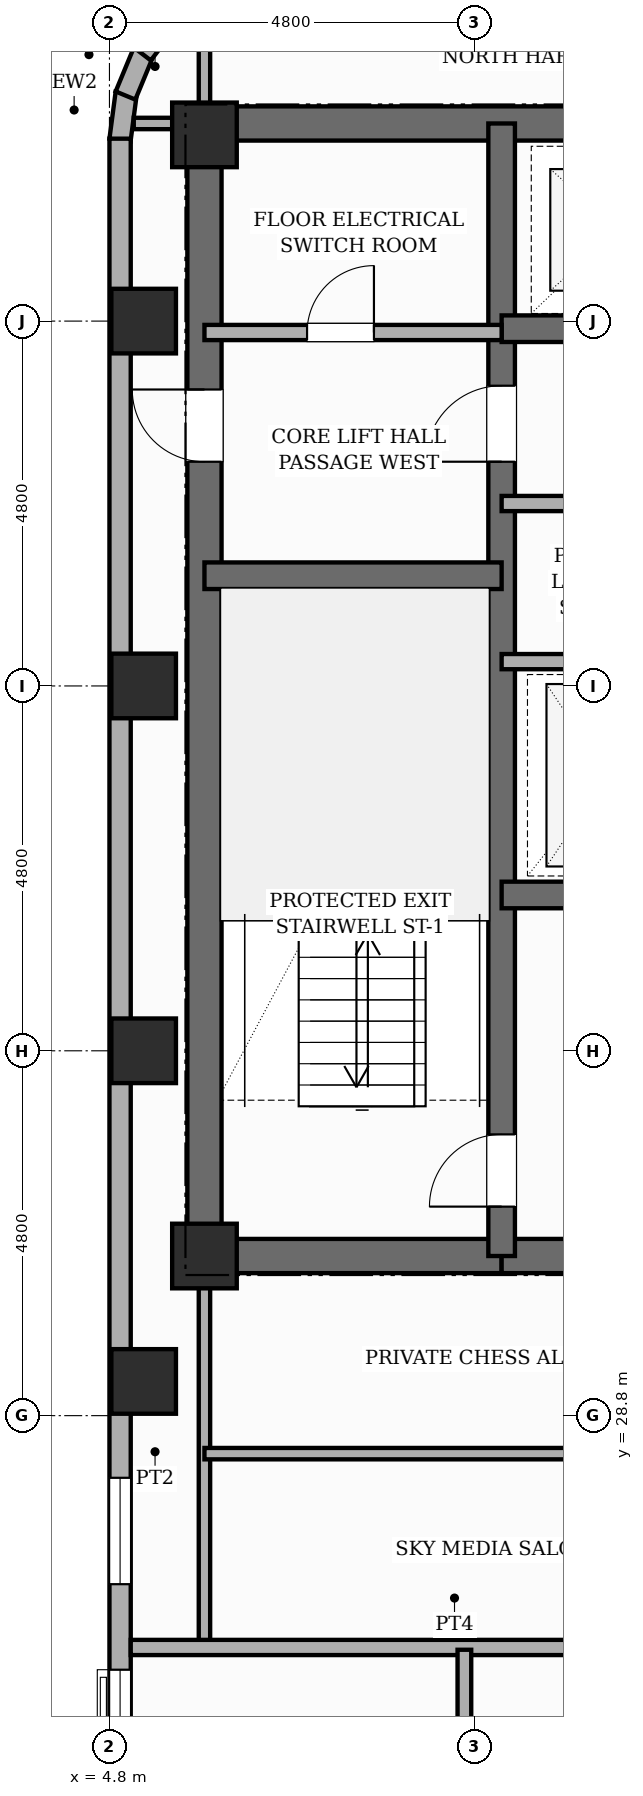
"""IFC4 building model, lengths in metres.
Left out: names, types, materials, properties, quantities, classifications, styles, units other than length and angle.
Written with IfcOpenShell. Run it as: python <this file> out.ifc"""

import sys

from ifc_helpers import new_model, si_unit, direction, frame, frame_2d, origin, origin_2d, place, context, subcontext, project, spatial, rectangle, extrude, element, fill, save


model = new_model("IFC4")
c1 = context("Model", 3, precision=1e-05, world=origin(), true_north=direction((0.0, 1.0)))
c2 = subcontext(c1, "Body", "Model", "MODEL_VIEW")
j1 = project(units=[si_unit("LENGTHUNIT", "METRE"), si_unit("PLANEANGLEUNIT", "RADIAN")], contexts=[c1])
p1 = place(None, origin())
s1 = spatial("IfcSite", under=j1, at=p1, CompositionType="ELEMENT")
p2 = place(p1, origin())
s2 = spatial("IfcBuilding", under=s1, at=p2, CompositionType="ELEMENT")
p3 = place(p2, frame((0.0, 0.0, 211.0)))
s3 = spatial("IfcBuildingStorey", under=s2, at=p3, CompositionType="ELEMENT", Elevation=211.0)
p4 = place(p3, frame((6.05, 30.675, 0.0), z_axis=(0.0, 0.0, 1.0), x_axis=(0.0, 1.0, 0.0)))
e1 = element("IfcWall", 1, at=p4, inside=s3, PredefinedType="SHEAR", context=c2, shape_type="SweptSolid", body=[
    extrude(rectangle(XDim=15.35, YDim=0.45, at=frame_2d((7.675, 0.0))), origin(), (0.0, 0.0, 1.0), 3.6),
])
p5 = place(p4, frame((10.675, 0.0, 0.0)))
e2 = element("IfcOpeningElement", 2, at=p5, cuts=e1, PredefinedType="OPENING", context=c2, shape_type="SweptSolid", body=[
    extrude(rectangle(XDim=0.95, YDim=2.15, at=frame_2d((0.475, 1.075))), frame((0.0, 0.235, 0.0), z_axis=(0.0, -1.0, 0.0), x_axis=(1.0, 0.0, 0.0)), (0.0, 0.0, 1.0), 0.47),
])
p6 = place(p3, frame((6.05, 45.8, 0.0), z_axis=(0.0, 0.0, 1.0), x_axis=(1.0, 0.0, 0.0)))
e3 = element("IfcWall", 3, at=p6, inside=s3, PredefinedType="SHEAR", context=c2, shape_type="SweptSolid", body=[
    extrude(rectangle(XDim=16.7, YDim=0.45, at=frame_2d((8.35, 0.0))), origin(), (0.0, 0.0, 1.0), 3.6),
])
p7 = place(p3, frame((6.05, 30.9, 0.0), z_axis=(0.0, 0.0, 1.0), x_axis=(1.0, 0.0, 0.0)))
e4 = element("IfcWall", 4, at=p7, inside=s3, PredefinedType="SHEAR", context=c2, shape_type="SweptSolid", body=[
    extrude(rectangle(XDim=3.91, YDim=0.45, at=frame_2d((1.955, 0.0))), origin(), (0.0, 0.0, 1.0), 3.6),
])
p8 = place(p3, frame((9.96, 30.9, 0.0), z_axis=(0.0, 0.0, 1.0), x_axis=(1.0, 0.0, 0.0)))
e5 = element("IfcWall", 5, at=p8, inside=s3, PredefinedType="SHEAR", context=c2, shape_type="SweptSolid", body=[
    extrude(rectangle(XDim=8.88, YDim=0.45, at=frame_2d((4.44, 0.0))), origin(), (0.0, 0.0, 1.0), 3.6),
])
p9 = place(p8, frame((4.09, 0.0, 0.0)))
e6 = element("IfcOpeningElement", 6, at=p9, cuts=e5, PredefinedType="OPENING", context=c2, shape_type="SweptSolid", body=[
    extrude(rectangle(XDim=1.0, YDim=2.15, at=frame_2d((0.5, 1.075))), frame((0.0, 0.235, 0.0), z_axis=(0.0, -1.0, 0.0), x_axis=(1.0, 0.0, 0.0)), (0.0, 0.0, 1.0), 0.47),
])
p10 = place(p3, frame((9.96, 30.9, 0.0), z_axis=(0.0, 0.0, 1.0), x_axis=(0.0, 1.0, 0.0)))
e7 = element("IfcWall", 7, at=p10, inside=s3, PredefinedType="SHEAR", context=c2, shape_type="SweptSolid", body=[
    extrude(rectangle(XDim=14.9, YDim=0.35, at=frame_2d((7.45, 0.0))), origin(), (0.0, 0.0, 1.0), 3.6),
])
p11 = place(p10, frame((0.65, 0.0, 0.0)))
e8 = element("IfcOpeningElement", 8, at=p11, cuts=e7, PredefinedType="OPENING", context=c2, shape_type="SweptSolid", body=[
    extrude(rectangle(XDim=0.95, YDim=2.1, at=frame_2d((0.475, 1.05))), frame((0.0, 0.185, 0.0), z_axis=(0.0, -1.0, 0.0), x_axis=(1.0, 0.0, 0.0)), (0.0, 0.0, 1.0), 0.37),
])
p12 = place(p10, frame((10.45, 0.0, 0.0)))
e9 = element("IfcOpeningElement", 9, at=p12, cuts=e7, PredefinedType="OPENING", context=c2, shape_type="SweptSolid", body=[
    extrude(rectangle(XDim=1.0, YDim=2.15, at=frame_2d((0.5, 1.075))), frame((0.0, 0.185, 0.0), z_axis=(0.0, -1.0, 0.0), x_axis=(1.0, 0.0, 0.0)), (0.0, 0.0, 1.0), 0.37),
])
p13 = place(p3, frame((6.05, 39.85, 0.0), z_axis=(0.0, 0.0, 1.0), x_axis=(1.0, 0.0, 0.0)))
e10 = element("IfcWall", 10, at=p13, inside=s3, PredefinedType="SHEAR", context=c2, shape_type="SweptSolid", body=[
    extrude(rectangle(XDim=3.91, YDim=0.35, at=frame_2d((1.955, 0.0))), origin(), (0.0, 0.0, 1.0), 3.6),
])
p14 = place(p3, frame((9.96, 35.65, 0.0), z_axis=(0.0, 0.0, 1.0), x_axis=(1.0, 0.0, 0.0)))
e11 = element("IfcWall", 11, at=p14, inside=s3, PredefinedType="SHEAR", context=c2, shape_type="SweptSolid", body=[
    extrude(rectangle(XDim=8.88, YDim=0.35, at=frame_2d((4.44, 0.0))), origin(), (0.0, 0.0, 1.0), 3.6),
])
p15 = place(p14, frame((0.84, 0.0, 0.0)))
e12 = element("IfcOpeningElement", 12, at=p15, cuts=e11, PredefinedType="OPENING", context=c2, shape_type="SweptSolid", body=[
    extrude(rectangle(XDim=1.1, YDim=2.15, at=frame_2d((0.55, 1.075))), frame((0.0, 0.185, 0.0), z_axis=(0.0, -1.0, 0.0), x_axis=(1.0, 0.0, 0.0)), (0.0, 0.0, 1.0), 0.37),
])
p16 = place(p14, frame((5.24, 0.0, 0.0)))
e13 = element("IfcOpeningElement", 13, at=p16, cuts=e11, PredefinedType="OPENING", context=c2, shape_type="SweptSolid", body=[
    extrude(rectangle(XDim=1.1, YDim=2.15, at=frame_2d((0.55, 1.075))), frame((0.0, 0.185, 0.0), z_axis=(0.0, -1.0, 0.0), x_axis=(1.0, 0.0, 0.0)), (0.0, 0.0, 1.0), 0.37),
])
p17 = place(p14, frame((7.5, 0.0, 0.0)))
e14 = element("IfcOpeningElement", 14, at=p17, cuts=e11, PredefinedType="OPENING", context=c2, shape_type="SweptSolid", body=[
    extrude(rectangle(XDim=0.88, YDim=2.1, at=frame_2d((0.44, 1.05))), frame((0.0, 0.185, 0.0), z_axis=(0.0, -1.0, 0.0), x_axis=(1.0, 0.0, 0.0)), (0.0, 0.0, 1.0), 0.37),
])
p18 = place(p3, frame((9.96, 43.1, 0.0), z_axis=(0.0, 0.0, 1.0), x_axis=(1.0, 0.0, 0.0)))
e15 = element("IfcWall", 15, at=p18, inside=s3, PredefinedType="SHEAR", context=c2, shape_type="SweptSolid", body=[
    extrude(rectangle(XDim=8.88, YDim=0.35, at=frame_2d((4.44, 0.0))), origin(), (0.0, 0.0, 1.0), 3.6),
])
p19 = place(p18, frame((0.99, 0.0, 0.0)))
e16 = element("IfcOpeningElement", 16, at=p19, cuts=e15, PredefinedType="OPENING", context=c2, shape_type="SweptSolid", body=[
    extrude(rectangle(XDim=1.1, YDim=2.15, at=frame_2d((0.55, 1.075))), frame((0.0, 0.185, 0.0), z_axis=(0.0, -1.0, 0.0), x_axis=(1.0, 0.0, 0.0)), (0.0, 0.0, 1.0), 0.37),
])
p20 = place(p18, frame((3.89, 0.0, 0.0)))
e17 = element("IfcOpeningElement", 17, at=p20, cuts=e15, PredefinedType="OPENING", context=c2, shape_type="SweptSolid", body=[
    extrude(rectangle(XDim=1.1, YDim=2.15, at=frame_2d((0.55, 1.075))), frame((0.0, 0.185, 0.0), z_axis=(0.0, -1.0, 0.0), x_axis=(1.0, 0.0, 0.0)), (0.0, 0.0, 1.0), 0.37),
])
p21 = place(p18, frame((6.79, 0.0, 0.0)))
e18 = element("IfcOpeningElement", 18, at=p21, cuts=e15, PredefinedType="OPENING", context=c2, shape_type="SweptSolid", body=[
    extrude(rectangle(XDim=1.1, YDim=2.15, at=frame_2d((0.55, 1.075))), frame((0.0, 0.185, 0.0), z_axis=(0.0, -1.0, 0.0), x_axis=(1.0, 0.0, 0.0)), (0.0, 0.0, 1.0), 0.37),
])
for number, where, z_axis, x_axis in (
    (19, (5.25, 29.25, 0.0), (0.0, 0.0, 1.0), (1.0, 0.0, 0.0)),
    (20, (5.25, 33.6, 0.0), (0.0, 0.0, 1.0), (1.0, 0.0, 0.0)),
    (21, (5.25, 38.4, 0.0), (0.0, 0.0, 1.0), (1.0, 0.0, 0.0)),
    (22, (5.25, 43.2, 0.0), (0.0, 0.0, 1.0), (1.0, 0.0, 0.0)),
    (23, (6.05, 30.9, 0.0), (0.0, 0.0, 1.0), (1.0, 0.0, 0.0)),
    (24, (6.05, 45.65, 0.0), (0.0, 0.0, 1.0), (1.0, 0.0, 0.0)),
):
    element("IfcColumn", number, at=place(p3, frame(where, z_axis=z_axis, x_axis=x_axis)), inside=s3, PredefinedType="COLUMN", context=c2, shape_type="SweptSolid", body=[
        extrude(rectangle(XDim=0.85, YDim=0.85, at=origin_2d()), origin(), (0.0, 0.0, 1.0), 3.6),
    ])
for number, where, z_axis, x_axis in (
    (25, (4.939, 45.582, 0.0), (0.0, 0.0, 1.0), (0.131, 0.991, 0.0)),
    (26, (5.011, 46.167, 0.0), (0.0, 0.0, 1.0), (0.383, 0.924, 0.0)),
    (27, (5.233, 46.715, 0.0), (0.0, 0.0, 1.0), (0.609, 0.793, 0.0)),
):
    element("IfcWall", number, at=place(p3, frame(where, z_axis=z_axis, x_axis=x_axis)), inside=s3, PredefinedType="STANDARD", context=c2, shape_type="SweptSolid", body=[
        extrude(rectangle(XDim=0.626, YDim=0.28, at=frame_2d((0.313, 0.0))), origin(), (0.0, 0.0, 1.0), 3.38),
    ])
p22 = place(p3, frame((4.94, 12.0, 0.0), z_axis=(0.0, 0.0, 1.0), x_axis=(0.0, 1.0, 0.0)))
e28 = element("IfcWall", 28, at=p22, inside=s3, PredefinedType="STANDARD", context=c2, shape_type="SweptSolid", body=[
    extrude(rectangle(XDim=33.6, YDim=0.28, at=frame_2d((16.8, 0.0))), origin(), (0.0, 0.0, 1.0), 2.66),
])
p23 = place(p22, frame((9.05, 0.0, 0.0)))
e29 = element("IfcOpeningElement", 29, at=p23, cuts=e28, PredefinedType="OPENING", context=c2, shape_type="SweptSolid", body=[
    extrude(rectangle(XDim=1.1, YDim=2.15, at=frame_2d((0.55, 1.075))), frame((0.0, 0.15, 0.0), z_axis=(0.0, -1.0, 0.0), x_axis=(1.0, 0.0, 0.0)), (0.0, 0.0, 1.0), 0.3),
])
p24 = place(p22, frame((3.77, 0.0, 0.65)))
e30 = element("IfcOpeningElement", 30, at=p24, cuts=e28, PredefinedType="OPENING", context=c2, shape_type="SweptSolid", body=[
    extrude(rectangle(XDim=1.4, YDim=1.1, at=frame_2d((0.7, 0.55))), frame((0.0, 0.15, 0.0), z_axis=(0.0, -1.0, 0.0), x_axis=(1.0, 0.0, 0.0)), (0.0, 0.0, 1.0), 0.3),
])
p25 = place(p22, frame((0.731, 0.0, 0.45)))
e31 = element("IfcOpeningElement", 31, at=p25, cuts=e28, PredefinedType="OPENING", context=c2, shape_type="SweptSolid", body=[
    extrude(rectangle(XDim=0.95, YDim=1.8, at=frame_2d((0.475, 0.9))), frame((0.0, 0.15, 0.0), z_axis=(0.0, -1.0, 0.0), x_axis=(1.0, 0.0, 0.0)), (0.0, 0.0, 1.0), 0.3),
])
p26 = place(p22, frame((5.772, 0.0, 0.45)))
e32 = element("IfcOpeningElement", 32, at=p26, cuts=e28, PredefinedType="OPENING", context=c2, shape_type="SweptSolid", body=[
    extrude(rectangle(XDim=0.75, YDim=1.8, at=frame_2d((0.375, 0.9))), frame((0.0, 0.15, 0.0), z_axis=(0.0, -1.0, 0.0), x_axis=(1.0, 0.0, 0.0)), (0.0, 0.0, 1.0), 0.3),
])
p27 = place(p22, frame((12.708, 0.0, 0.45)))
e33 = element("IfcOpeningElement", 33, at=p27, cuts=e28, PredefinedType="OPENING", context=c2, shape_type="SweptSolid", body=[
    extrude(rectangle(XDim=0.75, YDim=1.8, at=frame_2d((0.375, 0.9))), frame((0.0, 0.15, 0.0), z_axis=(0.0, -1.0, 0.0), x_axis=(1.0, 0.0, 0.0)), (0.0, 0.0, 1.0), 0.3),
])
p28 = place(p22, frame((14.583, 0.0, 0.65)))
e34 = element("IfcOpeningElement", 34, at=p28, cuts=e28, PredefinedType="OPENING", context=c2, shape_type="SweptSolid", body=[
    extrude(rectangle(XDim=1.4, YDim=1.1, at=frame_2d((0.7, 0.55))), frame((0.0, 0.15, 0.0), z_axis=(0.0, -1.0, 0.0), x_axis=(1.0, 0.0, 0.0)), (0.0, 0.0, 1.0), 0.3),
])
p29 = place(p3, frame((9.96, 38.72, 0.0), z_axis=(0.0, 0.0, 1.0), x_axis=(1.0, 0.0, 0.0)))
e35 = element("IfcWall", 35, at=p29, inside=s3, PredefinedType="POLYGONAL", context=c2, shape_type="SweptSolid", body=[
    extrude(rectangle(XDim=7.06, YDim=0.2, at=frame_2d((3.53, 0.0))), origin(), (0.0, 0.0, 1.0), 3.38),
])
p30 = place(p3, frame((9.96, 40.8, 0.0), z_axis=(0.0, 0.0, 1.0), x_axis=(1.0, 0.0, 0.0)))
e36 = element("IfcWall", 36, at=p30, inside=s3, PredefinedType="POLYGONAL", context=c2, shape_type="SweptSolid", body=[
    extrude(rectangle(XDim=8.88, YDim=0.2, at=frame_2d((4.44, 0.0))), origin(), (0.0, 0.0, 1.0), 3.38),
])
p31 = place(p30, frame((7.5, 0.0, 0.0)))
e37 = element("IfcOpeningElement", 37, at=p31, cuts=e36, PredefinedType="OPENING", context=c2, shape_type="SweptSolid", body=[
    extrude(rectangle(XDim=0.88, YDim=2.1, at=frame_2d((0.44, 1.05))), frame((0.0, 0.11, 0.0), z_axis=(0.0, -1.0, 0.0), x_axis=(1.0, 0.0, 0.0)), (0.0, 0.0, 1.0), 0.22),
])
p32 = place(p30, frame((1.0, 0.0, 0.0)))
e38 = element("IfcOpeningElement", 38, at=p32, cuts=e36, PredefinedType="OPENING", context=c2, shape_type="SweptSolid", body=[
    extrude(rectangle(XDim=0.88, YDim=2.1, at=frame_2d((0.44, 1.05))), frame((0.0, 0.11, 0.0), z_axis=(0.0, -1.0, 0.0), x_axis=(1.0, 0.0, 0.0)), (0.0, 0.0, 1.0), 0.22),
])
p33 = place(p30, frame((3.4, 0.0, 0.0)))
e39 = element("IfcOpeningElement", 39, at=p33, cuts=e36, PredefinedType="OPENING", context=c2, shape_type="SweptSolid", body=[
    extrude(rectangle(XDim=0.88, YDim=2.1, at=frame_2d((0.44, 1.05))), frame((0.0, 0.11, 0.0), z_axis=(0.0, -1.0, 0.0), x_axis=(1.0, 0.0, 0.0)), (0.0, 0.0, 1.0), 0.22),
])
p34 = place(p30, frame((5.55, 0.0, 0.0)))
e40 = element("IfcOpeningElement", 40, at=p34, cuts=e36, PredefinedType="OPENING", context=c2, shape_type="SweptSolid", body=[
    extrude(rectangle(XDim=0.88, YDim=2.1, at=frame_2d((0.44, 1.05))), frame((0.0, 0.11, 0.0), z_axis=(0.0, -1.0, 0.0), x_axis=(1.0, 0.0, 0.0)), (0.0, 0.0, 1.0), 0.22),
])
p35 = place(p3, frame((6.05, 43.05, 0.0), z_axis=(0.0, 0.0, 1.0), x_axis=(1.0, 0.0, 0.0)))
e41 = element("IfcWall", 41, at=p35, inside=s3, PredefinedType="POLYGONAL", context=c2, shape_type="SweptSolid", body=[
    extrude(rectangle(XDim=3.91, YDim=0.2, at=frame_2d((1.955, 0.0))), origin(), (0.0, 0.0, 1.0), 2.66),
])
p36 = place(p35, frame((1.35, 0.0, 0.0)))
e42 = element("IfcOpeningElement", 42, at=p36, cuts=e41, PredefinedType="OPENING", context=c2, shape_type="SweptSolid", body=[
    extrude(rectangle(XDim=0.88, YDim=2.1, at=frame_2d((0.44, 1.05))), frame((0.0, 0.11, 0.0), z_axis=(0.0, -1.0, 0.0), x_axis=(1.0, 0.0, 0.0)), (0.0, 0.0, 1.0), 0.22),
])
p37 = place(p3, frame((6.05, 25.75, 0.0), z_axis=(0.0, 0.0, 1.0), x_axis=(0.0, 1.0, 0.0)))
e43 = element("IfcWall", 43, at=p37, inside=s3, PredefinedType="PARTITIONING", context=c2, shape_type="SweptSolid", body=[
    extrude(rectangle(XDim=5.15, YDim=0.15, at=frame_2d((2.575, 0.0))), origin(), (0.0, 0.0, 1.0), 3.38),
])
p38 = place(p3, frame((6.05, 28.3, 0.0), z_axis=(0.0, 0.0, 1.0), x_axis=(1.0, 0.0, 0.0)))
e44 = element("IfcWall", 44, at=p38, inside=s3, PredefinedType="PARTITIONING", context=c2, shape_type="SweptSolid", body=[
    extrude(rectangle(XDim=7.55, YDim=0.15, at=frame_2d((3.775, 0.0))), origin(), (0.0, 0.0, 1.0), 3.38),
])
p39 = place(p3, frame((5.08, 25.75, 0.0), z_axis=(0.0, 0.0, 1.0), x_axis=(1.0, 0.0, 0.0)))
e45 = element("IfcWall", 45, at=p39, inside=s3, PredefinedType="PARTITIONING", context=c2, shape_type="SweptSolid", body=[
    extrude(rectangle(XDim=8.52, YDim=0.2, at=frame_2d((4.26, 0.0))), origin(), (0.0, 0.0, 1.0), 3.38),
])
p40 = place(p3, frame((9.47, 22.94, 0.0), z_axis=(0.0, 0.0, 1.0), x_axis=(0.0, 1.0, 0.0)))
e46 = element("IfcWall", 46, at=p40, inside=s3, PredefinedType="PLUMBINGWALL", context=c2, shape_type="SweptSolid", body=[
    extrude(rectangle(XDim=2.78, YDim=0.18, at=frame_2d((1.39, 0.0))), origin(), (0.0, 0.0, 1.0), 3.38),
])
p41 = place(p3, frame((5.12, 45.8, 0.0), z_axis=(0.0, 0.0, 1.0), x_axis=(1.0, 0.0, 0.0)))
e47 = element("IfcWall", 47, at=p41, inside=s3, PredefinedType="PARTITIONING", context=c2, shape_type="SweptSolid", body=[
    extrude(rectangle(XDim=0.93, YDim=0.15, at=frame_2d((0.465, 0.0))), origin(), (0.0, 0.0, 1.0), 3.38),
])
p42 = place(p3, frame((6.05, 45.8, 0.0), z_axis=(0.0, 0.0, 1.0), x_axis=(0.0, 1.0, 0.0)))
e48 = element("IfcWall", 48, at=p42, inside=s3, PredefinedType="PARTITIONING", context=c2, shape_type="SweptSolid", body=[
    extrude(rectangle(XDim=1.5, YDim=0.15, at=frame_2d((0.75, 0.0))), origin(), (0.0, 0.0, 1.0), 3.38),
])
p43 = place(p27, origin())
e49 = element("IfcWindow", 49, at=p43, inside=s3, PartitioningType="SINGLE_PANEL", PredefinedType="WINDOW", context=c2, shape_type="SweptSolid", body=[
    extrude(rectangle(XDim=0.75, YDim=1.8, at=frame_2d((0.375, 0.9))), frame((0.0, 0.03, 0.0), z_axis=(0.0, -1.0, 0.0), x_axis=(1.0, 0.0, 0.0)), (0.0, 0.0, 1.0), 0.06),
])
fill(e33, e49)
p44 = place(p28, origin())
e50 = element("IfcWindow", 50, at=p44, inside=s3, PartitioningType="SINGLE_PANEL", PredefinedType="WINDOW", context=c2, shape_type="SweptSolid", body=[
    extrude(rectangle(XDim=1.4, YDim=1.1, at=frame_2d((0.7, 0.55))), frame((0.0, 0.03, 0.0), z_axis=(0.0, -1.0, 0.0), x_axis=(1.0, 0.0, 0.0)), (0.0, 0.0, 1.0), 0.06),
])
fill(e34, e50)
p45 = place(p11, origin())
e51 = element("IfcDoor", 51, at=p45, inside=s3, OperationType="SINGLE_SWING_LEFT", PredefinedType="DOOR", context=c2, shape_type="SweptSolid", body=[
    extrude(rectangle(XDim=0.95, YDim=2.1, at=frame_2d((0.475, 1.05))), frame((0.0, 0.025, 0.0), z_axis=(0.0, -1.0, 0.0), x_axis=(1.0, 0.0, 0.0)), (0.0, 0.0, 1.0), 0.05),
])
fill(e8, e51)
p46 = place(p12, origin())
e52 = element("IfcDoor", 52, at=p46, inside=s3, OperationType="SINGLE_SWING_LEFT", PredefinedType="DOOR", context=c2, shape_type="SweptSolid", body=[
    extrude(rectangle(XDim=1.0, YDim=2.15, at=frame_2d((0.5, 1.075))), frame((0.0, 0.025, 0.0), z_axis=(0.0, -1.0, 0.0), x_axis=(1.0, 0.0, 0.0)), (0.0, 0.0, 1.0), 0.05),
])
fill(e9, e52)
p47 = place(p5, origin())
e53 = element("IfcDoor", 53, at=p47, inside=s3, OperationType="SINGLE_SWING_RIGHT", PredefinedType="DOOR", context=c2, shape_type="SweptSolid", body=[
    extrude(rectangle(XDim=0.95, YDim=2.15, at=frame_2d((0.475, 1.075))), frame((0.0, 0.025, 0.0), z_axis=(0.0, -1.0, 0.0), x_axis=(1.0, 0.0, 0.0)), (0.0, 0.0, 1.0), 0.05),
])
fill(e2, e53)
p48 = place(p36, origin())
e54 = element("IfcDoor", 54, at=p48, inside=s3, OperationType="SINGLE_SWING_RIGHT", PredefinedType="DOOR", context=c2, shape_type="SweptSolid", body=[
    extrude(rectangle(XDim=0.88, YDim=2.1, at=frame_2d((0.44, 1.05))), frame((0.0, 0.025, 0.0), z_axis=(0.0, -1.0, 0.0), x_axis=(1.0, 0.0, 0.0)), (0.0, 0.0, 1.0), 0.05),
])
fill(e42, e54)
save(model, sys.argv[1])
